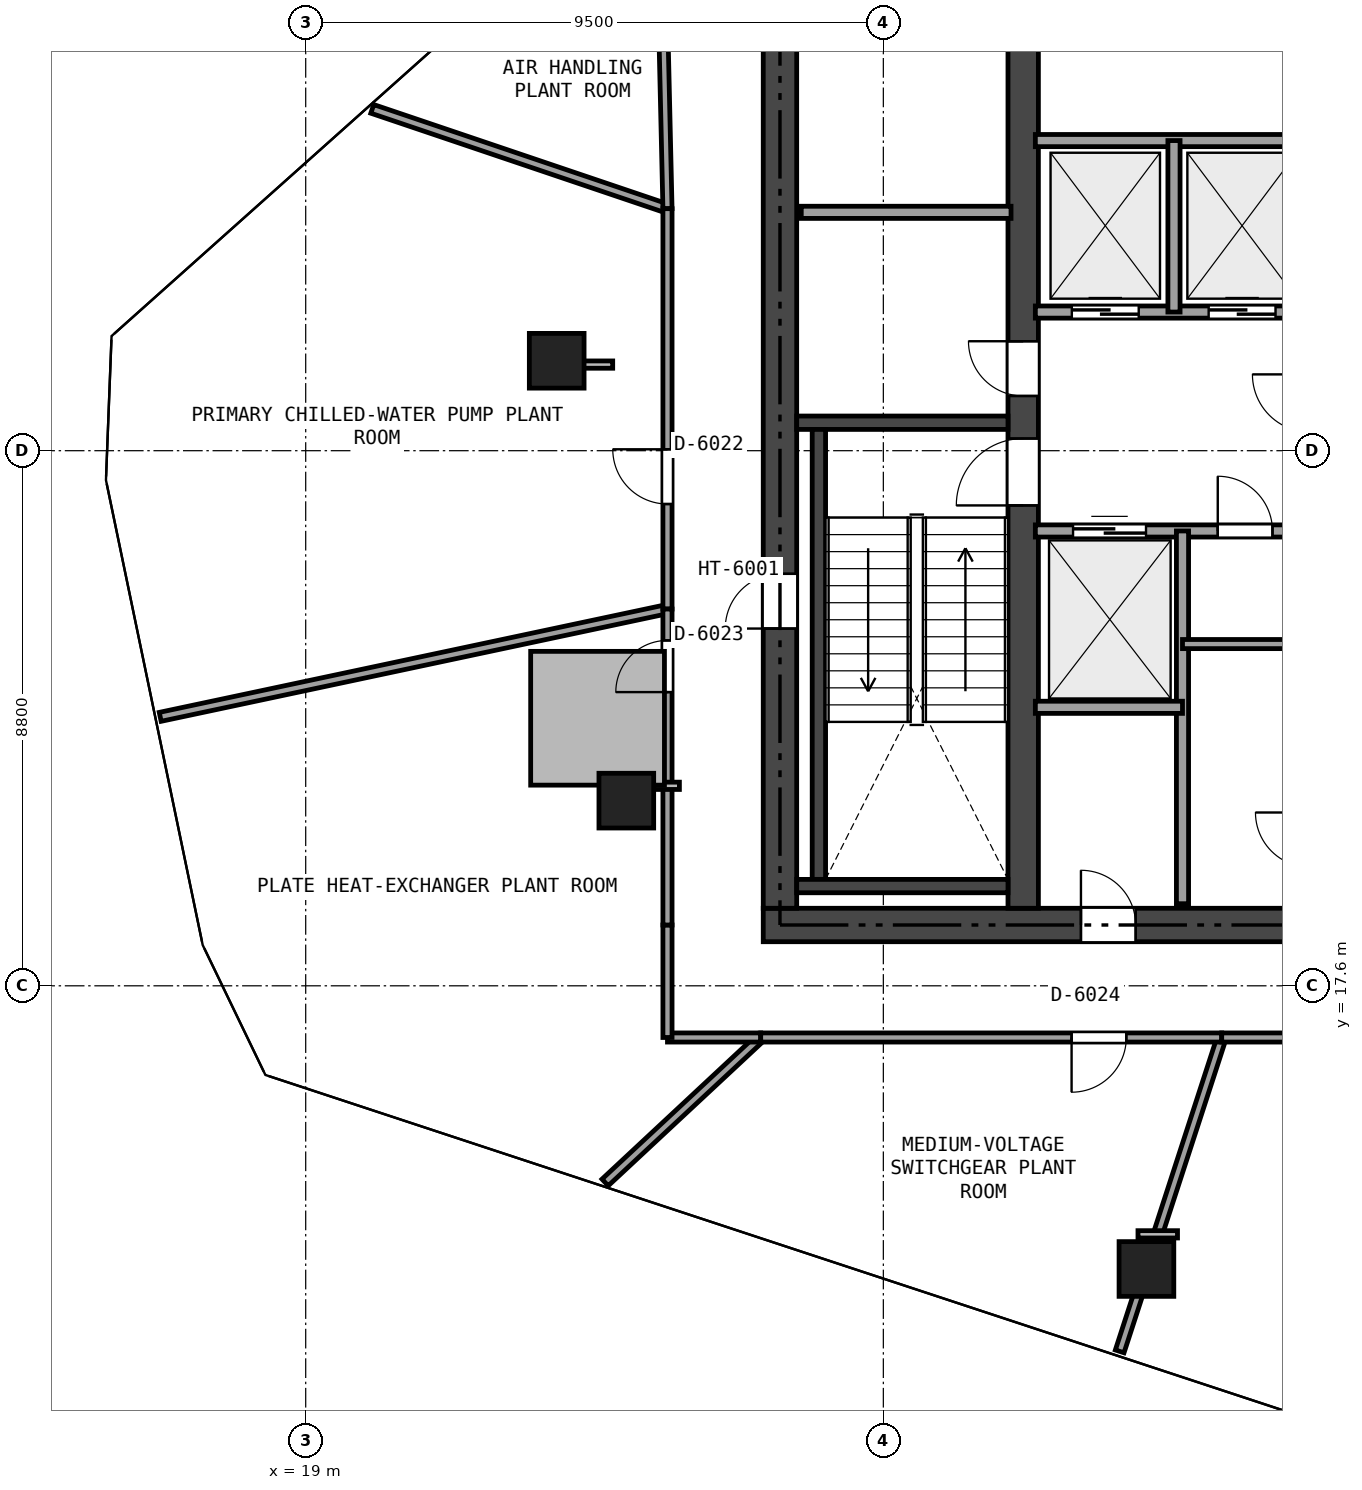
"""IFC4 building model, lengths in metres.
Left out: names, types, materials, properties, quantities, classifications, styles, units other than length and angle.
Written with IfcOpenShell. Run it as: python <this file> out.ifc"""

import sys

from ifc_helpers import new_model, si_unit, direction, frame, frame_2d, origin, origin_2d, place, context, subcontext, project, spatial, rectangle, extrude, element, fill, save


model = new_model("IFC4")
c1 = context("Model", 3, precision=1e-05, world=origin(), true_north=direction((0.0, 1.0)))
c2 = subcontext(c1, "Body", "Model", "MODEL_VIEW")
j1 = project(units=[si_unit("LENGTHUNIT", "METRE"), si_unit("PLANEANGLEUNIT", "RADIAN")], contexts=[c1])
p1 = place(None, origin())
s1 = spatial("IfcSite", under=j1, at=p1, CompositionType="ELEMENT")
p2 = place(p1, origin())
s2 = spatial("IfcBuilding", under=s1, at=p2, CompositionType="ELEMENT")
p3 = place(p2, frame((0.0, 0.0, 223.8)))
s3 = spatial("IfcBuildingStorey", under=s2, at=p3, CompositionType="ELEMENT", Elevation=223.8)
p4 = place(p3, frame((26.525, 18.6, 0.0), z_axis=(0.0, 0.0, 1.0), x_axis=(1.0, 0.0, 0.0)))
e1 = element("IfcWall", 1, at=p4, inside=s3, PredefinedType="SHEAR", context=c2, shape_type="SweptSolid", body=[
    extrude(rectangle(XDim=21.35, YDim=0.55, at=frame_2d((10.675, 0.0))), origin(), (0.0, 0.0, 1.0), 4.14),
])
p5 = place(p4, frame((12.4, 0.0, 0.0)))
e2 = element("IfcOpeningElement", 2, at=p5, cuts=e1, PredefinedType="OPENING", context=c2, shape_type="SweptSolid", body=[
    extrude(rectangle(XDim=1.15, YDim=2.15, at=frame_2d((0.575, 1.075))), frame((0.0, 0.285, 0.0), z_axis=(0.0, -1.0, 0.0), x_axis=(1.0, 0.0, 0.0)), (0.0, 0.0, 1.0), 0.57),
])
p6 = place(p4, frame((5.225, 0.0, 0.0)))
e3 = element("IfcOpeningElement", 3, at=p6, cuts=e1, PredefinedType="OPENING", context=c2, shape_type="SweptSolid", body=[
    extrude(rectangle(XDim=0.9, YDim=2.1, at=frame_2d((0.45, 1.05))), frame((0.0, 0.285, 0.0), z_axis=(0.0, -1.0, 0.0), x_axis=(1.0, 0.0, 0.0)), (0.0, 0.0, 1.0), 0.57),
])
p7 = place(p3, frame((26.8, 18.875, 0.0), z_axis=(0.0, 0.0, 1.0), x_axis=(0.0, 1.0, 0.0)))
e4 = element("IfcWall", 4, at=p7, inside=s3, PredefinedType="SHEAR", context=c2, shape_type="SweptSolid", body=[
    extrude(rectangle(XDim=15.05, YDim=0.55, at=frame_2d((7.525, 0.0))), origin(), (0.0, 0.0, 1.0), 4.14),
])
p8 = place(p7, frame((4.6, 0.0, 0.02)))
e5 = element("IfcOpeningElement", 5, at=p8, cuts=e4, PredefinedType="OPENING", context=c2, shape_type="SweptSolid", body=[
    extrude(rectangle(XDim=0.9, YDim=2.02, at=frame_2d((0.45, 1.01))), frame((0.0, 0.285, 0.0), z_axis=(0.0, -1.0, 0.0), x_axis=(1.0, 0.0, 0.0)), (0.0, 0.0, 1.0), 0.57),
])
p9 = place(p3, frame((30.8, 18.875, 0.0), z_axis=(0.0, 0.0, 1.0), x_axis=(0.0, 1.0, 0.0)))
e6 = element("IfcWall", 6, at=p9, inside=s3, PredefinedType="SHEAR", context=c2, shape_type="SweptSolid", body=[
    extrude(rectangle(XDim=15.05, YDim=0.5, at=frame_2d((7.525, 0.0))), origin(), (0.0, 0.0, 1.0), 4.14),
])
p10 = place(p9, frame((6.625, 0.0, 0.0)))
e7 = element("IfcOpeningElement", 7, at=p10, cuts=e6, PredefinedType="OPENING", context=c2, shape_type="SweptSolid", body=[
    extrude(rectangle(XDim=1.1, YDim=2.15, at=frame_2d((0.55, 1.075))), frame((0.0, 0.26, 0.0), z_axis=(0.0, -1.0, 0.0), x_axis=(1.0, 0.0, 0.0)), (0.0, 0.0, 1.0), 0.52),
])
p11 = place(p9, frame((8.425, 0.0, 0.0)))
e8 = element("IfcOpeningElement", 8, at=p11, cuts=e6, PredefinedType="OPENING", context=c2, shape_type="SweptSolid", body=[
    extrude(rectangle(XDim=0.9, YDim=2.1, at=frame_2d((0.45, 1.05))), frame((0.0, 0.26, 0.0), z_axis=(0.0, -1.0, 0.0), x_axis=(1.0, 0.0, 0.0)), (0.0, 0.0, 1.0), 0.52),
])
p12 = place(p3, frame((27.075, 26.86, 0.0), z_axis=(0.0, 0.0, 1.0), x_axis=(1.0, 0.0, 0.0)))
e9 = element("IfcWall", 9, at=p12, inside=s3, PredefinedType="SHEAR", context=c2, shape_type="SweptSolid", body=[
    extrude(rectangle(XDim=3.475, YDim=0.22, at=frame_2d((1.738, 0.0))), origin(), (0.0, 0.0, 1.0), 4.14),
])
p13 = place(p3, frame((27.44, 19.35, 0.0), z_axis=(0.0, 0.0, 1.0), x_axis=(0.0, 1.0, 0.0)))
e10 = element("IfcWall", 10, at=p13, inside=s3, PredefinedType="SHEAR", context=c2, shape_type="SweptSolid", body=[
    extrude(rectangle(XDim=7.4, YDim=0.22, at=frame_2d((3.7, 0.0))), origin(), (0.0, 0.0, 1.0), 4.14),
])
p14 = place(p3, frame((27.075, 19.24, 0.0), z_axis=(0.0, 0.0, 1.0), x_axis=(1.0, 0.0, 0.0)))
e11 = element("IfcWall", 11, at=p14, inside=s3, PredefinedType="SHEAR", context=c2, shape_type="SweptSolid", body=[
    extrude(rectangle(XDim=3.475, YDim=0.22, at=frame_2d((1.738, 0.0))), origin(), (0.0, 0.0, 1.0), 4.14),
])
for number, where, z_axis, x_axis in (
    (12, (23.128, 27.879, 0.0), (0.0, 0.0, 1.0), (1.0, 0.0, 0.0)),
    (13, (24.273, 20.645, 0.0), (0.0, 0.0, 1.0), (1.0, 0.0, 0.0)),
    (14, (32.827, 12.943, 0.0), (0.0, 0.0, 1.0), (1.0, 0.0, 0.0)),
):
    element("IfcColumn", number, at=place(p3, frame(where, z_axis=z_axis, x_axis=x_axis)), inside=s3, PredefinedType="COLUMN", context=c2, shape_type="SweptSolid", body=[
        extrude(rectangle(XDim=0.9, YDim=0.9, at=origin_2d()), origin(), (0.0, 0.0, 1.0), 4.14),
    ])
p15 = place(p3, frame((27.15, 30.32, 0.0), z_axis=(0.0, 0.0, 1.0), x_axis=(1.0, 0.0, 0.0)))
e15 = element("IfcWall", 15, at=p15, inside=s3, PredefinedType="SOLIDWALL", context=c2, shape_type="SweptSolid", body=[
    extrude(rectangle(XDim=3.45, YDim=0.2, at=frame_2d((1.725, 0.0))), origin(), (0.0, 0.0, 1.0), 4.14),
])
p16 = place(p3, frame((31.0, 28.68, 0.0), z_axis=(0.0, 0.0, 1.0), x_axis=(1.0, 0.0, 0.0)))
e16 = element("IfcWall", 16, at=p16, inside=s3, PredefinedType="SOLIDWALL", context=c2, shape_type="SweptSolid", body=[
    extrude(rectangle(XDim=4.42, YDim=0.2, at=frame_2d((2.21, 0.0))), origin(), (0.0, 0.0, 1.0), 4.14),
])
p17 = place(p16, frame((0.6, 0.0, 0.0)))
e17 = element("IfcOpeningElement", 17, at=p17, cuts=e16, PredefinedType="OPENING", context=c2, shape_type="SweptSolid", body=[
    extrude(rectangle(XDim=1.1, YDim=2.15, at=frame_2d((0.55, 1.075))), frame((0.0, 0.11, 0.0), z_axis=(0.0, -1.0, 0.0), x_axis=(1.0, 0.0, 0.0)), (0.0, 0.0, 1.0), 0.22),
])
p18 = place(p16, frame((2.85, 0.0, 0.0)))
e18 = element("IfcOpeningElement", 18, at=p18, cuts=e16, PredefinedType="OPENING", context=c2, shape_type="SweptSolid", body=[
    extrude(rectangle(XDim=1.1, YDim=2.15, at=frame_2d((0.55, 1.075))), frame((0.0, 0.11, 0.0), z_axis=(0.0, -1.0, 0.0), x_axis=(1.0, 0.0, 0.0)), (0.0, 0.0, 1.0), 0.22),
])
p19 = place(p3, frame((31.0, 31.5, 0.0), z_axis=(0.0, 0.0, 1.0), x_axis=(1.0, 0.0, 0.0)))
e19 = element("IfcWall", 19, at=p19, inside=s3, PredefinedType="SOLIDWALL", context=c2, shape_type="SweptSolid", body=[
    extrude(rectangle(XDim=4.42, YDim=0.2, at=frame_2d((2.21, 0.0))), origin(), (0.0, 0.0, 1.0), 4.14),
])
p20 = place(p3, frame((33.28, 28.68, 0.0), z_axis=(0.0, 0.0, 1.0), x_axis=(0.0, 1.0, 0.0)))
e20 = element("IfcWall", 20, at=p20, inside=s3, PredefinedType="SOLIDWALL", context=c2, shape_type="SweptSolid", body=[
    extrude(rectangle(XDim=2.82, YDim=0.2, at=frame_2d((1.41, 0.0))), origin(), (0.0, 0.0, 1.0), 4.14),
])
p21 = place(p3, frame((31.0, 25.08, 0.0), z_axis=(0.0, 0.0, 1.0), x_axis=(1.0, 0.0, 0.0)))
e21 = element("IfcWall", 21, at=p21, inside=s3, PredefinedType="SOLIDWALL", context=c2, shape_type="SweptSolid", body=[
    extrude(rectangle(XDim=4.42, YDim=0.2, at=frame_2d((2.21, 0.0))), origin(), (0.0, 0.0, 1.0), 4.14),
])
p22 = place(p21, frame((3.0, 0.0, 0.0)))
e22 = element("IfcOpeningElement", 22, at=p22, cuts=e21, PredefinedType="OPENING", context=c2, shape_type="SweptSolid", body=[
    extrude(rectangle(XDim=0.9, YDim=2.1, at=frame_2d((0.45, 1.05))), frame((0.0, 0.11, 0.0), z_axis=(0.0, -1.0, 0.0), x_axis=(1.0, 0.0, 0.0)), (0.0, 0.0, 1.0), 0.22),
])
p23 = place(p21, frame((0.62, 0.0, 0.0)))
e23 = element("IfcOpeningElement", 23, at=p23, cuts=e21, PredefinedType="OPENING", context=c2, shape_type="SweptSolid", body=[
    extrude(rectangle(XDim=1.2, YDim=2.15, at=frame_2d((0.6, 1.075))), frame((0.0, 0.11, 0.0), z_axis=(0.0, -1.0, 0.0), x_axis=(1.0, 0.0, 0.0)), (0.0, 0.0, 1.0), 0.22),
])
p24 = place(p3, frame((33.42, 18.95, 0.0), z_axis=(0.0, 0.0, 1.0), x_axis=(0.0, 1.0, 0.0)))
e24 = element("IfcWall", 24, at=p24, inside=s3, PredefinedType="SOLIDWALL", context=c2, shape_type="SweptSolid", body=[
    extrude(rectangle(XDim=6.13, YDim=0.2, at=frame_2d((3.065, 0.0))), origin(), (0.0, 0.0, 1.0), 3.661),
])
p25 = place(p3, frame((31.0, 22.18, 0.0), z_axis=(0.0, 0.0, 1.0), x_axis=(1.0, 0.0, 0.0)))
e25 = element("IfcWall", 25, at=p25, inside=s3, PredefinedType="SOLIDWALL", context=c2, shape_type="SweptSolid", body=[
    extrude(rectangle(XDim=2.42, YDim=0.2, at=frame_2d((1.21, 0.0))), origin(), (0.0, 0.0, 1.0), 4.14),
])
p26 = place(p3, frame((33.42, 23.22, 0.0), z_axis=(0.0, 0.0, 1.0), x_axis=(1.0, 0.0, 0.0)))
e26 = element("IfcWall", 26, at=p26, inside=s3, PredefinedType="PARTITIONING", context=c2, shape_type="SweptSolid", body=[
    extrude(rectangle(XDim=2.0, YDim=0.15, at=frame_2d((1.0, 0.0))), origin(), (0.0, 0.0, 1.0), 4.14),
])
p27 = place(p3, frame((20.095, 32.021, 0.0), z_axis=(0.0, 0.0, 1.0), x_axis=(0.947340977862, -0.320226594247, 0.0)))
e27 = element("IfcWall", 27, at=p27, inside=s3, PredefinedType="PARTITIONING", context=c2, shape_type="SweptSolid", body=[
    extrude(rectangle(XDim=5.125, YDim=0.15, at=frame_2d((2.562, 0.0))), origin(), (0.0, 0.0, 1.0), 3.725),
])
p28 = place(p3, frame((24.95, 30.38, 0.0), z_axis=(0.0, 0.0, 1.0), x_axis=(-0.023103865091, 0.999733070083, 0.0)))
e28 = element("IfcWall", 28, at=p28, inside=s3, PredefinedType="PARTITIONING", context=c2, shape_type="SweptSolid", body=[
    extrude(rectangle(XDim=5.844, YDim=0.15, at=frame_2d((2.922, 0.0))), origin(), (0.0, 0.0, 1.0), 3.725),
])
p29 = place(p28, frame((4.704, 0.0, 0.0)))
e29 = element("IfcOpeningElement", 29, at=p29, cuts=e28, PredefinedType="OPENING", context=c2, shape_type="SweptSolid", body=[
    extrude(rectangle(XDim=0.9, YDim=2.0, at=frame_2d((0.45, 1.0))), frame((0.0, 0.085, 0.0), z_axis=(0.0, -1.0, 0.0), x_axis=(1.0, 0.0, 0.0)), (0.0, 0.0, 1.0), 0.17),
])
p30 = place(p3, frame((16.607, 22.023, 0.0), z_axis=(0.0, 0.0, 1.0), x_axis=(0.978157468709, 0.207865260228, 0.0)))
e30 = element("IfcWall", 30, at=p30, inside=s3, PredefinedType="PARTITIONING", context=c2, shape_type="SweptSolid", body=[
    extrude(rectangle(XDim=8.529, YDim=0.15, at=frame_2d((4.265, 0.0))), origin(), (0.0, 0.0, 1.0), 3.725),
])
p31 = place(p3, frame((24.95, 23.796, 0.0), z_axis=(0.0, 0.0, 1.0), x_axis=(0.0, 1.0, 0.0)))
e31 = element("IfcWall", 31, at=p31, inside=s3, PredefinedType="PARTITIONING", context=c2, shape_type="SweptSolid", body=[
    extrude(rectangle(XDim=6.584, YDim=0.15, at=frame_2d((3.292, 0.0))), origin(), (0.0, 0.0, 1.0), 3.125),
])
p32 = place(p31, frame((1.727, 0.0, 0.0)))
e32 = element("IfcOpeningElement", 32, at=p32, cuts=e31, PredefinedType="OPENING", context=c2, shape_type="SweptSolid", body=[
    extrude(rectangle(XDim=0.9, YDim=2.0, at=frame_2d((0.45, 1.0))), frame((0.0, 0.085, 0.0), z_axis=(0.0, -1.0, 0.0), x_axis=(1.0, 0.0, 0.0)), (0.0, 0.0, 1.0), 0.17),
])
p33 = place(p3, frame((23.924, 14.366, 0.0), z_axis=(0.0, 0.0, 1.0), x_axis=(0.731656227453, 0.681673796496, 0.0)))
e33 = element("IfcWall", 33, at=p33, inside=s3, PredefinedType="PARTITIONING", context=c2, shape_type="SweptSolid", body=[
    extrude(rectangle(XDim=3.497, YDim=0.15, at=frame_2d((1.749, 0.0))), origin(), (0.0, 0.0, 1.0), 4.14),
])
p34 = place(p3, frame((26.483, 16.75, 0.0), z_axis=(0.0, 0.0, 1.0), x_axis=(-1.0, 0.0, 0.0)))
e34 = element("IfcWall", 34, at=p34, inside=s3, PredefinedType="PARTITIONING", context=c2, shape_type="SweptSolid", body=[
    extrude(rectangle(XDim=1.533, YDim=0.15, at=frame_2d((0.767, 0.0))), origin(), (0.0, 0.0, 1.0), 4.14),
])
p35 = place(p3, frame((24.95, 16.75, 0.0), z_axis=(0.0, 0.0, 1.0), x_axis=(0.0, 1.0, 0.0)))
e35 = element("IfcWall", 35, at=p35, inside=s3, PredefinedType="PARTITIONING", context=c2, shape_type="SweptSolid", body=[
    extrude(rectangle(XDim=1.85, YDim=0.15, at=frame_2d((0.925, 0.0))), origin(), (0.0, 0.0, 1.0), 4.14),
])
p36 = place(p3, frame((24.95, 18.6, 0.0), z_axis=(0.0, 0.0, 1.0), x_axis=(0.0, 1.0, 0.0)))
e36 = element("IfcWall", 36, at=p36, inside=s3, PredefinedType="PARTITIONING", context=c2, shape_type="SweptSolid", body=[
    extrude(rectangle(XDim=5.196, YDim=0.15, at=frame_2d((2.598, 0.0))), origin(), (0.0, 0.0, 1.0), 3.125),
])
p37 = place(p36, frame((3.83, 0.0, 0.0)))
e37 = element("IfcOpeningElement", 37, at=p37, cuts=e36, PredefinedType="OPENING", context=c2, shape_type="SweptSolid", body=[
    extrude(rectangle(XDim=0.85, YDim=2.0, at=frame_2d((0.425, 1.0))), frame((0.0, 0.085, 0.0), z_axis=(0.0, -1.0, 0.0), x_axis=(1.0, 0.0, 0.0)), (0.0, 0.0, 1.0), 0.17),
])
p38 = place(p3, frame((32.387, 11.588, 0.0), z_axis=(0.0, 0.0, 1.0), x_axis=(0.309134889379, 0.951018201807, 0.0)))
e38 = element("IfcWall", 38, at=p38, inside=s3, PredefinedType="PARTITIONING", context=c2, shape_type="SweptSolid", body=[
    extrude(rectangle(XDim=5.428, YDim=0.15, at=frame_2d((2.714, 0.0))), origin(), (0.0, 0.0, 1.0), 3.125),
])
p39 = place(p3, frame((34.065, 16.75, 0.0), z_axis=(0.0, 0.0, 1.0), x_axis=(-1.0, 0.0, 0.0)))
e39 = element("IfcWall", 39, at=p39, inside=s3, PredefinedType="PARTITIONING", context=c2, shape_type="SweptSolid", body=[
    extrude(rectangle(XDim=7.582, YDim=0.15, at=frame_2d((3.791, 0.0))), origin(), (0.0, 0.0, 1.0), 3.125),
])
p40 = place(p39, frame((1.569, 0.0, 0.0)))
e40 = element("IfcOpeningElement", 40, at=p40, cuts=e39, PredefinedType="OPENING", context=c2, shape_type="SweptSolid", body=[
    extrude(rectangle(XDim=0.9, YDim=2.0, at=frame_2d((0.45, 1.0))), frame((0.0, 0.085, 0.0), z_axis=(0.0, -1.0, 0.0), x_axis=(1.0, 0.0, 0.0)), (0.0, 0.0, 1.0), 0.17),
])
p41 = place(p3, frame((39.251, 16.75, 0.0), z_axis=(0.0, 0.0, 1.0), x_axis=(-1.0, 0.0, 0.0)))
e41 = element("IfcWall", 41, at=p41, inside=s3, PredefinedType="PARTITIONING", context=c2, shape_type="SweptSolid", body=[
    extrude(rectangle(XDim=5.186, YDim=0.15, at=frame_2d((2.593, 0.0))), origin(), (0.0, 0.0, 1.0), 3.125),
])
p42 = place(p41, frame((2.143, 0.0, 0.0)))
e42 = element("IfcOpeningElement", 42, at=p42, cuts=e41, PredefinedType="OPENING", context=c2, shape_type="SweptSolid", body=[
    extrude(rectangle(XDim=0.9, YDim=2.0, at=frame_2d((0.45, 1.0))), frame((0.0, 0.085, 0.0), z_axis=(0.0, -1.0, 0.0), x_axis=(1.0, 0.0, 0.0)), (0.0, 0.0, 1.0), 0.17),
])
p43 = place(p8, origin())
e43 = element("IfcDoor", 43, at=p43, inside=s3, OperationType="SINGLE_SWING_LEFT", PredefinedType="TRAPDOOR", context=c2, shape_type="SweptSolid", body=[
    extrude(rectangle(XDim=0.9, YDim=2.02, at=frame_2d((0.45, 1.01))), frame((0.0, 0.025, 0.0), z_axis=(0.0, -1.0, 0.0), x_axis=(1.0, 0.0, 0.0)), (0.0, 0.0, 1.0), 0.05),
])
fill(e5, e43)
p44 = place(p10, origin())
e44 = element("IfcDoor", 44, at=p44, inside=s3, OperationType="SINGLE_SWING_LEFT", PredefinedType="DOOR", context=c2, shape_type="SweptSolid", body=[
    extrude(rectangle(XDim=1.1, YDim=2.15, at=frame_2d((0.55, 1.075))), frame((0.0, 0.025, 0.0), z_axis=(0.0, -1.0, 0.0), x_axis=(1.0, 0.0, 0.0)), (0.0, 0.0, 1.0), 0.05),
])
fill(e7, e44)
p45 = place(p11, origin())
e45 = element("IfcDoor", 45, at=p45, inside=s3, OperationType="SINGLE_SWING_RIGHT", PredefinedType="DOOR", context=c2, shape_type="SweptSolid", body=[
    extrude(rectangle(XDim=0.9, YDim=2.1, at=frame_2d((0.45, 1.05))), frame((0.0, 0.025, 0.0), z_axis=(0.0, -1.0, 0.0), x_axis=(1.0, 0.0, 0.0)), (0.0, 0.0, 1.0), 0.05),
])
fill(e8, e45)
p46 = place(p6, origin())
e46 = element("IfcDoor", 46, at=p46, inside=s3, OperationType="SINGLE_SWING_LEFT", PredefinedType="DOOR", context=c2, shape_type="SweptSolid", body=[
    extrude(rectangle(XDim=0.9, YDim=2.1, at=frame_2d((0.45, 1.05))), frame((0.0, 0.025, 0.0), z_axis=(0.0, -1.0, 0.0), x_axis=(1.0, 0.0, 0.0)), (0.0, 0.0, 1.0), 0.05),
])
fill(e3, e46)
p47 = place(p22, origin())
e47 = element("IfcDoor", 47, at=p47, inside=s3, OperationType="SINGLE_SWING_LEFT", PredefinedType="DOOR", context=c2, shape_type="SweptSolid", body=[
    extrude(rectangle(XDim=0.9, YDim=2.1, at=frame_2d((0.45, 1.05))), frame((0.0, 0.025, 0.0), z_axis=(0.0, -1.0, 0.0), x_axis=(1.0, 0.0, 0.0)), (0.0, 0.0, 1.0), 0.05),
])
fill(e22, e47)
p48 = place(p17, origin())
e48 = element("IfcDoor", 48, at=p48, inside=s3, OperationType="SLIDING_TO_LEFT", PredefinedType="DOOR", context=c2, shape_type="SweptSolid", body=[
    extrude(rectangle(XDim=1.1, YDim=2.15, at=frame_2d((0.55, 1.075))), frame((0.0, 0.025, 0.0), z_axis=(0.0, -1.0, 0.0), x_axis=(1.0, 0.0, 0.0)), (0.0, 0.0, 1.0), 0.05),
])
fill(e17, e48)
p49 = place(p18, origin())
e49 = element("IfcDoor", 49, at=p49, inside=s3, OperationType="SLIDING_TO_LEFT", PredefinedType="DOOR", context=c2, shape_type="SweptSolid", body=[
    extrude(rectangle(XDim=1.1, YDim=2.15, at=frame_2d((0.55, 1.075))), frame((0.0, 0.025, 0.0), z_axis=(0.0, -1.0, 0.0), x_axis=(1.0, 0.0, 0.0)), (0.0, 0.0, 1.0), 0.05),
])
fill(e18, e49)
p50 = place(p23, origin())
e50 = element("IfcDoor", 50, at=p50, inside=s3, OperationType="SLIDING_TO_LEFT", PredefinedType="DOOR", context=c2, shape_type="SweptSolid", body=[
    extrude(rectangle(XDim=1.2, YDim=2.15, at=frame_2d((0.6, 1.075))), frame((0.0, 0.025, 0.0), z_axis=(0.0, -1.0, 0.0), x_axis=(1.0, 0.0, 0.0)), (0.0, 0.0, 1.0), 0.05),
])
fill(e23, e50)
p51 = place(p32, origin())
e51 = element("IfcDoor", 51, at=p51, inside=s3, OperationType="SINGLE_SWING_RIGHT", PredefinedType="DOOR", context=c2, shape_type="SweptSolid", body=[
    extrude(rectangle(XDim=0.9, YDim=2.0, at=frame_2d((0.45, 1.0))), frame((0.0, 0.025, 0.0), z_axis=(0.0, -1.0, 0.0), x_axis=(1.0, 0.0, 0.0)), (0.0, 0.0, 1.0), 0.05),
])
fill(e32, e51)
p52 = place(p37, origin())
e52 = element("IfcDoor", 52, at=p52, inside=s3, OperationType="SINGLE_SWING_LEFT", PredefinedType="DOOR", context=c2, shape_type="SweptSolid", body=[
    extrude(rectangle(XDim=0.85, YDim=2.0, at=frame_2d((0.425, 1.0))), frame((0.0, 0.025, 0.0), z_axis=(0.0, -1.0, 0.0), x_axis=(1.0, 0.0, 0.0)), (0.0, 0.0, 1.0), 0.05),
])
fill(e37, e52)
p53 = place(p40, origin())
e53 = element("IfcDoor", 53, at=p53, inside=s3, OperationType="SINGLE_SWING_RIGHT", PredefinedType="DOOR", context=c2, shape_type="SweptSolid", body=[
    extrude(rectangle(XDim=0.9, YDim=2.0, at=frame_2d((0.45, 1.0))), frame((0.0, 0.025, 0.0), z_axis=(0.0, -1.0, 0.0), x_axis=(1.0, 0.0, 0.0)), (0.0, 0.0, 1.0), 0.05),
])
fill(e40, e53)
save(model, sys.argv[1])
